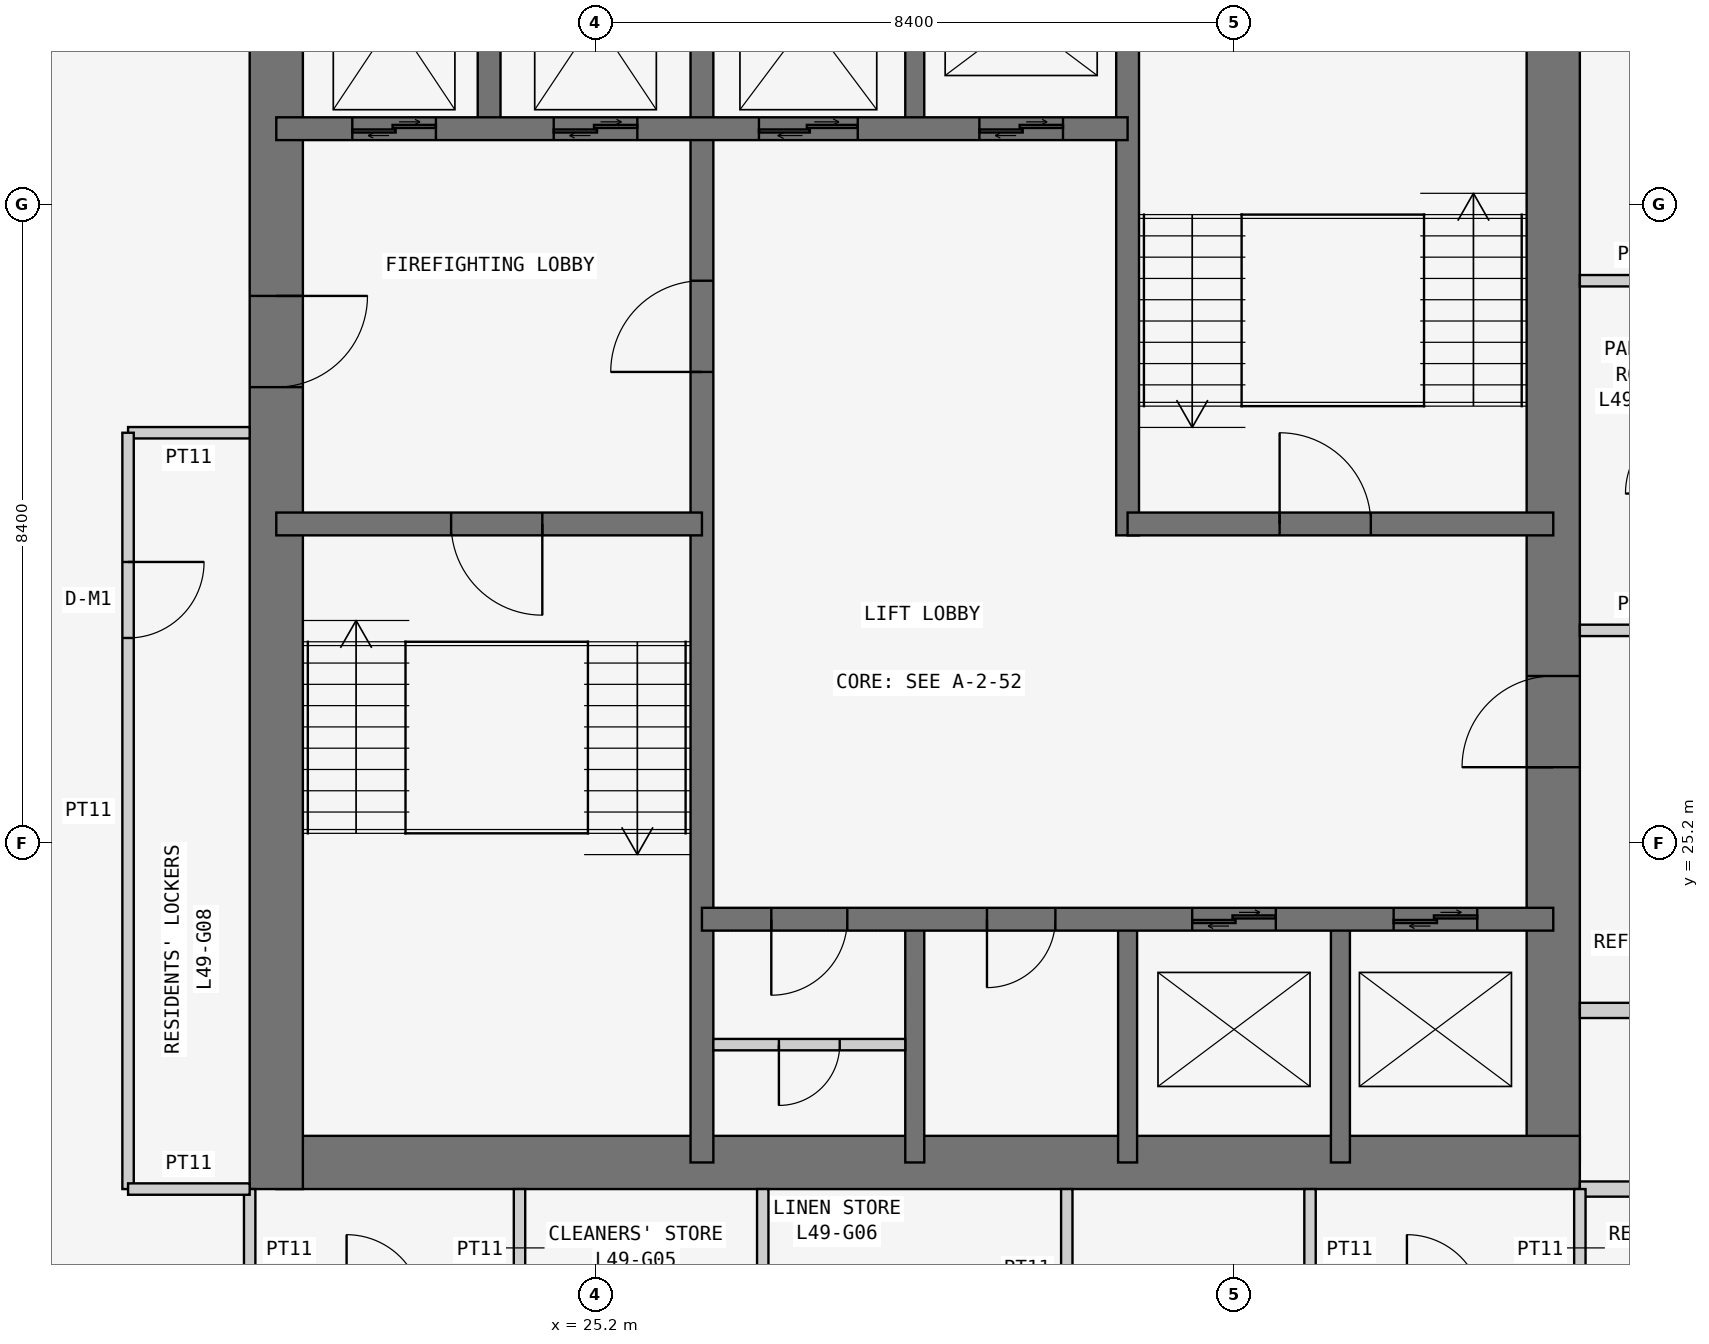
"""IFC4 building model, lengths in metres.
Left out: names, types, materials, properties, quantities, classifications, styles, units other than length and angle.
Written with IfcOpenShell. Run it as: python <this file> out.ifc"""

import sys

from ifc_helpers import new_model, si_unit, direction, frame, frame_2d, origin, place, context, subcontext, project, spatial, rectangle, extrude, element, fill, save


model = new_model("IFC4")
c1 = context("Model", 3, precision=1e-05, world=origin(), true_north=direction((0.0, 1.0)))
c2 = subcontext(c1, "Body", "Model", "MODEL_VIEW")
j1 = project(units=[si_unit("LENGTHUNIT", "METRE"), si_unit("PLANEANGLEUNIT", "RADIAN")], contexts=[c1])
p1 = place(None, origin())
s1 = spatial("IfcSite", under=j1, at=p1, CompositionType="ELEMENT")
p2 = place(p1, origin())
s2 = spatial("IfcBuilding", under=s1, at=p2, CompositionType="ELEMENT")
p3 = place(p2, frame((0.0, 0.0, 190.5)))
s3 = spatial("IfcBuildingStorey", under=s2, at=p3, CompositionType="ELEMENT", Elevation=190.5)
p4 = place(p3, frame((21.0, 21.0, 0.0), z_axis=(0.0, 0.0, 1.0), x_axis=(1.0, 0.0, 0.0)))
e1 = element("IfcWall", 1, at=p4, inside=s3, PredefinedType="SHEAR", context=c2, shape_type="SweptSolid", body=[
    extrude(rectangle(XDim=17.15, YDim=0.7, at=frame_2d((8.575, 0.0))), origin(), (0.0, 0.0, 1.0), 3.6),
])
p5 = place(p3, frame((37.8, 21.0, 0.0), z_axis=(0.0, 0.0, 1.0), x_axis=(0.0, 1.0, 0.0)))
e2 = element("IfcWall", 2, at=p5, inside=s3, PredefinedType="SHEAR", context=c2, shape_type="SweptSolid", body=[
    extrude(rectangle(XDim=17.15, YDim=0.7, at=frame_2d((8.575, 0.0))), origin(), (0.0, 0.0, 1.0), 3.6),
])
p6 = place(p5, frame((5.2, 0.0, 0.0)))
e3 = element("IfcOpeningElement", 3, at=p6, cuts=e2, PredefinedType="OPENING", context=c2, shape_type="SweptSolid", body=[
    extrude(rectangle(XDim=1.2, YDim=2.1, at=frame_2d((0.6, 1.05))), frame((0.0, 0.36, 0.0), z_axis=(0.0, -1.0, 0.0), x_axis=(1.0, 0.0, 0.0)), (0.0, 0.0, 1.0), 0.72),
])
p7 = place(p3, frame((21.0, 37.8, 0.0), z_axis=(0.0, 0.0, 1.0), x_axis=(0.0, -1.0, 0.0)))
e4 = element("IfcWall", 4, at=p7, inside=s3, PredefinedType="SHEAR", context=c2, shape_type="SweptSolid", body=[
    extrude(rectangle(XDim=17.15, YDim=0.7, at=frame_2d((8.575, 0.0))), origin(), (0.0, 0.0, 1.0), 3.6),
])
p8 = place(p7, frame((5.4, 0.0, 0.0)))
e5 = element("IfcOpeningElement", 5, at=p8, cuts=e4, PredefinedType="OPENING", context=c2, shape_type="SweptSolid", body=[
    extrude(rectangle(XDim=1.2, YDim=2.1, at=frame_2d((0.6, 1.05))), frame((0.0, 0.36, 0.0), z_axis=(0.0, -1.0, 0.0), x_axis=(1.0, 0.0, 0.0)), (0.0, 0.0, 1.0), 0.72),
])
p9 = place(p3, frame((26.6, 21.0, 0.0), z_axis=(0.0, 0.0, 1.0), x_axis=(0.0, 1.0, 0.0)))
e6 = element("IfcWall", 6, at=p9, inside=s3, PredefinedType="SHEAR", context=c2, shape_type="SweptSolid", body=[
    extrude(rectangle(XDim=16.8, YDim=0.3, at=frame_2d((8.4, 0.0))), origin(), (0.0, 0.0, 1.0), 3.6),
])
p10 = place(p9, frame((10.4, 0.0, 0.0)))
e7 = element("IfcOpeningElement", 7, at=p10, cuts=e6, PredefinedType="OPENING", context=c2, shape_type="SweptSolid", body=[
    extrude(rectangle(XDim=1.2, YDim=2.1, at=frame_2d((0.6, 1.05))), frame((0.0, 0.16, 0.0), z_axis=(0.0, -1.0, 0.0), x_axis=(1.0, 0.0, 0.0)), (0.0, 0.0, 1.0), 0.32),
])
p11 = place(p3, frame((21.0, 29.4, 0.0), z_axis=(0.0, 0.0, 1.0), x_axis=(1.0, 0.0, 0.0)))
e8 = element("IfcWall", 8, at=p11, inside=s3, PredefinedType="SHEAR", context=c2, shape_type="SweptSolid", body=[
    extrude(rectangle(XDim=5.6, YDim=0.3, at=frame_2d((2.8, 0.0))), origin(), (0.0, 0.0, 1.0), 3.6),
])
p12 = place(p11, frame((2.3, 0.0, 0.0)))
e9 = element("IfcOpeningElement", 9, at=p12, cuts=e8, PredefinedType="OPENING", context=c2, shape_type="SweptSolid", body=[
    extrude(rectangle(XDim=1.2, YDim=2.1, at=frame_2d((0.6, 1.05))), frame((0.0, 0.16, 0.0), z_axis=(0.0, -1.0, 0.0), x_axis=(1.0, 0.0, 0.0)), (0.0, 0.0, 1.0), 0.32),
])
p13 = place(p3, frame((21.0, 34.6, 0.0), z_axis=(0.0, 0.0, 1.0), x_axis=(1.0, 0.0, 0.0)))
e10 = element("IfcWall", 10, at=p13, inside=s3, PredefinedType="SHEAR", context=c2, shape_type="SweptSolid", body=[
    extrude(rectangle(XDim=11.2, YDim=0.3, at=frame_2d((5.6, 0.0))), origin(), (0.0, 0.0, 1.0), 3.6),
])
p14 = place(p13, frame((9.25, 0.0, 0.0)))
e11 = element("IfcOpeningElement", 11, at=p14, cuts=e10, PredefinedType="OPENING", context=c2, shape_type="SweptSolid", body=[
    extrude(rectangle(XDim=1.1, YDim=2.1, at=frame_2d((0.55, 1.05))), frame((0.0, 0.16, 0.0), z_axis=(0.0, -1.0, 0.0), x_axis=(1.0, 0.0, 0.0)), (0.0, 0.0, 1.0), 0.32),
])
p15 = place(p13, frame((1.0, 0.0, 0.0)))
e12 = element("IfcOpeningElement", 12, at=p15, cuts=e10, PredefinedType="OPENING", context=c2, shape_type="SweptSolid", body=[
    extrude(rectangle(XDim=1.1, YDim=2.1, at=frame_2d((0.55, 1.05))), frame((0.0, 0.16, 0.0), z_axis=(0.0, -1.0, 0.0), x_axis=(1.0, 0.0, 0.0)), (0.0, 0.0, 1.0), 0.32),
])
p16 = place(p13, frame((3.65, 0.0, 0.0)))
e13 = element("IfcOpeningElement", 13, at=p16, cuts=e10, PredefinedType="OPENING", context=c2, shape_type="SweptSolid", body=[
    extrude(rectangle(XDim=1.1, YDim=2.1, at=frame_2d((0.55, 1.05))), frame((0.0, 0.16, 0.0), z_axis=(0.0, -1.0, 0.0), x_axis=(1.0, 0.0, 0.0)), (0.0, 0.0, 1.0), 0.32),
])
p17 = place(p13, frame((6.35, 0.0, 0.0)))
e14 = element("IfcOpeningElement", 14, at=p17, cuts=e10, PredefinedType="OPENING", context=c2, shape_type="SweptSolid", body=[
    extrude(rectangle(XDim=1.3, YDim=2.1, at=frame_2d((0.65, 1.05))), frame((0.0, 0.16, 0.0), z_axis=(0.0, -1.0, 0.0), x_axis=(1.0, 0.0, 0.0)), (0.0, 0.0, 1.0), 0.32),
])
p18 = place(p3, frame((23.8, 34.6, 0.0), z_axis=(0.0, 0.0, 1.0), x_axis=(0.0, 1.0, 0.0)))
e15 = element("IfcWall", 15, at=p18, inside=s3, PredefinedType="SHEAR", context=c2, shape_type="SweptSolid", body=[
    extrude(rectangle(XDim=3.2, YDim=0.3, at=frame_2d((1.6, 0.0))), origin(), (0.0, 0.0, 1.0), 3.6),
])
p19 = place(p3, frame((26.6, 24.2, 0.0), z_axis=(0.0, 0.0, 1.0), x_axis=(1.0, 0.0, 0.0)))
e16 = element("IfcWall", 16, at=p19, inside=s3, PredefinedType="SHEAR", context=c2, shape_type="SweptSolid", body=[
    extrude(rectangle(XDim=11.2, YDim=0.3, at=frame_2d((5.6, 0.0))), origin(), (0.0, 0.0, 1.0), 3.6),
])
p20 = place(p19, frame((0.913, 0.0, 0.0)))
e17 = element("IfcOpeningElement", 17, at=p20, cuts=e16, PredefinedType="OPENING", context=c2, shape_type="SweptSolid", body=[
    extrude(rectangle(XDim=1.0, YDim=2.1, at=frame_2d((0.5, 1.05))), frame((0.0, 0.16, 0.0), z_axis=(0.0, -1.0, 0.0), x_axis=(1.0, 0.0, 0.0)), (0.0, 0.0, 1.0), 0.32),
])
p21 = place(p19, frame((3.75, 0.0, 0.0)))
e18 = element("IfcOpeningElement", 18, at=p21, cuts=e16, PredefinedType="OPENING", context=c2, shape_type="SweptSolid", body=[
    extrude(rectangle(XDim=0.9, YDim=2.1, at=frame_2d((0.45, 1.05))), frame((0.0, 0.16, 0.0), z_axis=(0.0, -1.0, 0.0), x_axis=(1.0, 0.0, 0.0)), (0.0, 0.0, 1.0), 0.32),
])
p22 = place(p19, frame((6.45, 0.0, 0.0)))
e19 = element("IfcOpeningElement", 19, at=p22, cuts=e16, PredefinedType="OPENING", context=c2, shape_type="SweptSolid", body=[
    extrude(rectangle(XDim=1.1, YDim=2.1, at=frame_2d((0.55, 1.05))), frame((0.0, 0.16, 0.0), z_axis=(0.0, -1.0, 0.0), x_axis=(1.0, 0.0, 0.0)), (0.0, 0.0, 1.0), 0.32),
])
p23 = place(p19, frame((9.1, 0.0, 0.0)))
e20 = element("IfcOpeningElement", 20, at=p23, cuts=e16, PredefinedType="OPENING", context=c2, shape_type="SweptSolid", body=[
    extrude(rectangle(XDim=1.1, YDim=2.1, at=frame_2d((0.55, 1.05))), frame((0.0, 0.16, 0.0), z_axis=(0.0, -1.0, 0.0), x_axis=(1.0, 0.0, 0.0)), (0.0, 0.0, 1.0), 0.32),
])
p24 = place(p3, frame((32.2, 29.25, 0.0), z_axis=(0.0, 0.0, 1.0), x_axis=(0.0, 1.0, 0.0)))
e21 = element("IfcWall", 21, at=p24, inside=s3, PredefinedType="SHEAR", context=c2, shape_type="SweptSolid", body=[
    extrude(rectangle(XDim=8.55, YDim=0.3, at=frame_2d((4.275, 0.0))), origin(), (0.0, 0.0, 1.0), 3.6),
])
p25 = place(p3, frame((32.2, 29.4, 0.0), z_axis=(0.0, 0.0, 1.0), x_axis=(1.0, 0.0, 0.0)))
e22 = element("IfcWall", 22, at=p25, inside=s3, PredefinedType="SHEAR", context=c2, shape_type="SweptSolid", body=[
    extrude(rectangle(XDim=5.6, YDim=0.3, at=frame_2d((2.8, 0.0))), origin(), (0.0, 0.0, 1.0), 3.6),
])
p26 = place(p25, frame((2.0, 0.0, 0.0)))
e23 = element("IfcOpeningElement", 23, at=p26, cuts=e22, PredefinedType="OPENING", context=c2, shape_type="SweptSolid", body=[
    extrude(rectangle(XDim=1.2, YDim=2.1, at=frame_2d((0.6, 1.05))), frame((0.0, 0.16, 0.0), z_axis=(0.0, -1.0, 0.0), x_axis=(1.0, 0.0, 0.0)), (0.0, 0.0, 1.0), 0.32),
])
for number, where, z_axis, x_axis in (
    (24, (29.4, 21.0, 0.0), (0.0, 0.0, 1.0), (0.0, 1.0, 0.0)),
    (25, (32.2, 21.0, 0.0), (0.0, 0.0, 1.0), (0.0, 1.0, 0.0)),
    (26, (35.0, 21.0, 0.0), (0.0, 0.0, 1.0), (0.0, 1.0, 0.0)),
    (27, (29.4, 34.6, 0.0), (0.0, 0.0, 1.0), (0.0, 1.0, 0.0)),
):
    element("IfcWall", number, at=place(p3, frame(where, z_axis=z_axis, x_axis=x_axis)), inside=s3, PredefinedType="SHEAR", context=c2, shape_type="SweptSolid", body=[
        extrude(rectangle(XDim=3.2, YDim=0.25, at=frame_2d((1.6, 0.0))), origin(), (0.0, 0.0, 1.0), 3.6),
    ])
for number, where, z_axis, x_axis in (
    (28, (38.15, 20.65, 0.0), (0.0, 0.0, 1.0), (1.0, 0.0, 0.0)),
    (29, (40.6, 23.0, 0.0), (0.0, 0.0, 1.0), (-1.0, 0.0, 0.0)),
):
    element("IfcWall", number, at=place(p3, frame(where, z_axis=z_axis, x_axis=x_axis)), inside=s3, PredefinedType="PARTITIONING", context=c2, shape_type="SweptSolid", body=[
        extrude(rectangle(XDim=2.45, YDim=0.2, at=frame_2d((1.225, 0.0))), origin(), (0.0, 0.0, 1.0), 3.45),
    ])
for number, where, z_axis, x_axis in (
    (30, (38.15, 28.0, 0.0), (0.0, 0.0, 1.0), (1.0, 0.0, 0.0)),
    (31, (39.75, 32.6, 0.0), (0.0, 0.0, 1.0), (-1.0, 0.0, 0.0)),
):
    element("IfcWall", number, at=place(p3, frame(where, z_axis=z_axis, x_axis=x_axis)), inside=s3, PredefinedType="PARTITIONING", context=c2, shape_type="SweptSolid", body=[
        extrude(rectangle(XDim=1.6, YDim=0.15, at=frame_2d((0.8, 0.0))), origin(), (0.0, 0.0, 1.0), 3.45),
    ])
for number, where, z_axis, x_axis in (
    (32, (20.65, 20.65, 0.0), (0.0, 0.0, 1.0), (0.0, -1.0, 0.0)),
    (33, (24.2, 19.05, 0.0), (0.0, 0.0, 1.0), (0.0, 1.0, 0.0)),
):
    element("IfcWall", number, at=place(p3, frame(where, z_axis=z_axis, x_axis=x_axis)), inside=s3, PredefinedType="PARTITIONING", context=c2, shape_type="SweptSolid", body=[
        extrude(rectangle(XDim=1.6, YDim=0.15, at=frame_2d((0.8, 0.0))), origin(), (0.0, 0.0, 1.0), 3.45),
    ])
for number, where, z_axis, x_axis in (
    (34, (27.4, 20.65, 0.0), (0.0, 0.0, 1.0), (0.0, -1.0, 0.0)),
    (35, (31.4, 18.55, 0.0), (0.0, 0.0, 1.0), (0.0, 1.0, 0.0)),
):
    element("IfcWall", number, at=place(p3, frame(where, z_axis=z_axis, x_axis=x_axis)), inside=s3, PredefinedType="PARTITIONING", context=c2, shape_type="SweptSolid", body=[
        extrude(rectangle(XDim=2.1, YDim=0.15, at=frame_2d((1.05, 0.0))), origin(), (0.0, 0.0, 1.0), 3.45),
    ])
for number, where, z_axis, x_axis in (
    (36, (34.6, 20.65, 0.0), (0.0, 0.0, 1.0), (0.0, -1.0, 0.0)),
    (37, (38.15, 19.05, 0.0), (0.0, 0.0, 1.0), (0.0, 1.0, 0.0)),
    (38, (20.65, 30.6, 0.0), (0.0, 0.0, 1.0), (-1.0, 0.0, 0.0)),
):
    element("IfcWall", number, at=place(p3, frame(where, z_axis=z_axis, x_axis=x_axis)), inside=s3, PredefinedType="PARTITIONING", context=c2, shape_type="SweptSolid", body=[
        extrude(rectangle(XDim=1.6, YDim=0.15, at=frame_2d((0.8, 0.0))), origin(), (0.0, 0.0, 1.0), 3.45),
    ])
p27 = place(p3, frame((19.05, 30.6, 0.0), z_axis=(0.0, 0.0, 1.0), x_axis=(0.0, -1.0, 0.0)))
e39 = element("IfcWall", 39, at=p27, inside=s3, PredefinedType="PARTITIONING", context=c2, shape_type="SweptSolid", body=[
    extrude(rectangle(XDim=9.95, YDim=0.15, at=frame_2d((4.975, 0.0))), origin(), (0.0, 0.0, 1.0), 3.45),
])
p28 = place(p27, frame((1.7, 0.0, 0.0)))
e40 = element("IfcOpeningElement", 40, at=p28, cuts=e39, PredefinedType="OPENING", context=c2, shape_type="SweptSolid", body=[
    extrude(rectangle(XDim=1.0, YDim=2.1, at=frame_2d((0.5, 1.05))), frame((0.0, 0.085, 0.0), z_axis=(0.0, -1.0, 0.0), x_axis=(1.0, 0.0, 0.0)), (0.0, 0.0, 1.0), 0.17),
])
p29 = place(p3, frame((19.05, 20.65, 0.0), z_axis=(0.0, 0.0, 1.0), x_axis=(1.0, 0.0, 0.0)))
e41 = element("IfcWall", 41, at=p29, inside=s3, PredefinedType="PARTITIONING", context=c2, shape_type="SweptSolid", body=[
    extrude(rectangle(XDim=1.6, YDim=0.15, at=frame_2d((0.8, 0.0))), origin(), (0.0, 0.0, 1.0), 3.45),
])
p30 = place(p3, frame((26.75, 22.55, 0.0), z_axis=(0.0, 0.0, 1.0), x_axis=(1.0, 0.0, 0.0)))
e42 = element("IfcWall", 42, at=p30, inside=s3, PredefinedType="PARTITIONING", context=c2, shape_type="SweptSolid", body=[
    extrude(rectangle(XDim=2.525, YDim=0.15, at=frame_2d((1.262, 0.0))), origin(), (0.0, 0.0, 1.0), 3.45),
])
p31 = place(p30, frame((0.863, 0.0, 0.0)))
e43 = element("IfcOpeningElement", 43, at=p31, cuts=e42, PredefinedType="OPENING", context=c2, shape_type="SweptSolid", body=[
    extrude(rectangle(XDim=0.8, YDim=2.1, at=frame_2d((0.4, 1.05))), frame((0.0, 0.085, 0.0), z_axis=(0.0, -1.0, 0.0), x_axis=(1.0, 0.0, 0.0)), (0.0, 0.0, 1.0), 0.17),
])
p32 = place(p28, origin())
e44 = element("IfcDoor", 44, at=p32, inside=s3, OperationType="SINGLE_SWING_LEFT", PredefinedType="DOOR", context=c2, shape_type="SweptSolid", body=[
    extrude(rectangle(XDim=1.0, YDim=2.1, at=frame_2d((0.5, 1.05))), frame((0.0, 0.025, 0.0), z_axis=(0.0, -1.0, 0.0), x_axis=(1.0, 0.0, 0.0)), (0.0, 0.0, 1.0), 0.05),
])
fill(e40, e44)
p33 = place(p8, origin())
e45 = element("IfcDoor", 45, at=p33, inside=s3, OperationType="SINGLE_SWING_LEFT", PredefinedType="DOOR", context=c2, shape_type="SweptSolid", body=[
    extrude(rectangle(XDim=1.2, YDim=2.1, at=frame_2d((0.6, 1.05))), frame((0.0, 0.025, 0.0), z_axis=(0.0, -1.0, 0.0), x_axis=(1.0, 0.0, 0.0)), (0.0, 0.0, 1.0), 0.05),
])
fill(e5, e45)
p34 = place(p12, frame((1.2, 0.0, 0.0), z_axis=(0.0, 0.0, 1.0), x_axis=(-1.0, 0.0, 0.0)))
e46 = element("IfcDoor", 46, at=p34, inside=s3, OperationType="SINGLE_SWING_LEFT", PredefinedType="DOOR", context=c2, shape_type="SweptSolid", body=[
    extrude(rectangle(XDim=1.2, YDim=2.1, at=frame_2d((0.6, 1.05))), frame((0.0, 0.025, 0.0), z_axis=(0.0, -1.0, 0.0), x_axis=(1.0, 0.0, 0.0)), (0.0, 0.0, 1.0), 0.05),
])
fill(e9, e46)
p35 = place(p10, origin())
e47 = element("IfcDoor", 47, at=p35, inside=s3, OperationType="SINGLE_SWING_LEFT", PredefinedType="DOOR", context=c2, shape_type="SweptSolid", body=[
    extrude(rectangle(XDim=1.2, YDim=2.1, at=frame_2d((0.6, 1.05))), frame((0.0, 0.025, 0.0), z_axis=(0.0, -1.0, 0.0), x_axis=(1.0, 0.0, 0.0)), (0.0, 0.0, 1.0), 0.05),
])
fill(e7, e47)
p36 = place(p6, origin())
e48 = element("IfcDoor", 48, at=p36, inside=s3, OperationType="SINGLE_SWING_LEFT", PredefinedType="DOOR", context=c2, shape_type="SweptSolid", body=[
    extrude(rectangle(XDim=1.2, YDim=2.1, at=frame_2d((0.6, 1.05))), frame((0.0, 0.025, 0.0), z_axis=(0.0, -1.0, 0.0), x_axis=(1.0, 0.0, 0.0)), (0.0, 0.0, 1.0), 0.05),
])
fill(e3, e48)
p37 = place(p26, origin())
e49 = element("IfcDoor", 49, at=p37, inside=s3, OperationType="SINGLE_SWING_LEFT", PredefinedType="DOOR", context=c2, shape_type="SweptSolid", body=[
    extrude(rectangle(XDim=1.2, YDim=2.1, at=frame_2d((0.6, 1.05))), frame((0.0, 0.025, 0.0), z_axis=(0.0, -1.0, 0.0), x_axis=(1.0, 0.0, 0.0)), (0.0, 0.0, 1.0), 0.05),
])
fill(e23, e49)
p38 = place(p20, frame((1.0, 0.0, 0.0), z_axis=(0.0, 0.0, 1.0), x_axis=(-1.0, 0.0, 0.0)))
e50 = element("IfcDoor", 50, at=p38, inside=s3, OperationType="SINGLE_SWING_RIGHT", PredefinedType="DOOR", context=c2, shape_type="SweptSolid", body=[
    extrude(rectangle(XDim=1.0, YDim=2.1, at=frame_2d((0.5, 1.05))), frame((0.0, 0.025, 0.0), z_axis=(0.0, -1.0, 0.0), x_axis=(1.0, 0.0, 0.0)), (0.0, 0.0, 1.0), 0.05),
])
fill(e17, e50)
p39 = place(p31, frame((0.8, 0.0, 0.0), z_axis=(0.0, 0.0, 1.0), x_axis=(-1.0, 0.0, 0.0)))
e51 = element("IfcDoor", 51, at=p39, inside=s3, OperationType="SINGLE_SWING_RIGHT", PredefinedType="DOOR", context=c2, shape_type="SweptSolid", body=[
    extrude(rectangle(XDim=0.8, YDim=2.1, at=frame_2d((0.4, 1.05))), frame((0.0, 0.025, 0.0), z_axis=(0.0, -1.0, 0.0), x_axis=(1.0, 0.0, 0.0)), (0.0, 0.0, 1.0), 0.05),
])
fill(e43, e51)
p40 = place(p21, frame((0.9, 0.0, 0.0), z_axis=(0.0, 0.0, 1.0), x_axis=(-1.0, 0.0, 0.0)))
e52 = element("IfcDoor", 52, at=p40, inside=s3, OperationType="SINGLE_SWING_RIGHT", PredefinedType="DOOR", context=c2, shape_type="SweptSolid", body=[
    extrude(rectangle(XDim=0.9, YDim=2.1, at=frame_2d((0.45, 1.05))), frame((0.0, 0.025, 0.0), z_axis=(0.0, -1.0, 0.0), x_axis=(1.0, 0.0, 0.0)), (0.0, 0.0, 1.0), 0.05),
])
fill(e18, e52)
p41 = place(p22, origin())
e53 = element("IfcDoor", 53, at=p41, inside=s3, OperationType="DOUBLE_DOOR_SLIDING", PredefinedType="DOOR", context=c2, shape_type="SweptSolid", body=[
    extrude(rectangle(XDim=1.1, YDim=2.1, at=frame_2d((0.55, 1.05))), frame((0.0, 0.025, 0.0), z_axis=(0.0, -1.0, 0.0), x_axis=(1.0, 0.0, 0.0)), (0.0, 0.0, 1.0), 0.05),
])
fill(e19, e53)
p42 = place(p23, origin())
e54 = element("IfcDoor", 54, at=p42, inside=s3, OperationType="DOUBLE_DOOR_SLIDING", PredefinedType="DOOR", context=c2, shape_type="SweptSolid", body=[
    extrude(rectangle(XDim=1.1, YDim=2.1, at=frame_2d((0.55, 1.05))), frame((0.0, 0.025, 0.0), z_axis=(0.0, -1.0, 0.0), x_axis=(1.0, 0.0, 0.0)), (0.0, 0.0, 1.0), 0.05),
])
fill(e20, e54)
p43 = place(p14, origin())
e55 = element("IfcDoor", 55, at=p43, inside=s3, OperationType="DOUBLE_DOOR_SLIDING", PredefinedType="DOOR", context=c2, shape_type="SweptSolid", body=[
    extrude(rectangle(XDim=1.1, YDim=2.1, at=frame_2d((0.55, 1.05))), frame((0.0, 0.025, 0.0), z_axis=(0.0, -1.0, 0.0), x_axis=(1.0, 0.0, 0.0)), (0.0, 0.0, 1.0), 0.05),
])
fill(e11, e55)
p44 = place(p15, origin())
e56 = element("IfcDoor", 56, at=p44, inside=s3, OperationType="DOUBLE_DOOR_SLIDING", PredefinedType="DOOR", context=c2, shape_type="SweptSolid", body=[
    extrude(rectangle(XDim=1.1, YDim=2.1, at=frame_2d((0.55, 1.05))), frame((0.0, 0.025, 0.0), z_axis=(0.0, -1.0, 0.0), x_axis=(1.0, 0.0, 0.0)), (0.0, 0.0, 1.0), 0.05),
])
fill(e12, e56)
p45 = place(p16, origin())
e57 = element("IfcDoor", 57, at=p45, inside=s3, OperationType="DOUBLE_DOOR_SLIDING", PredefinedType="DOOR", context=c2, shape_type="SweptSolid", body=[
    extrude(rectangle(XDim=1.1, YDim=2.1, at=frame_2d((0.55, 1.05))), frame((0.0, 0.025, 0.0), z_axis=(0.0, -1.0, 0.0), x_axis=(1.0, 0.0, 0.0)), (0.0, 0.0, 1.0), 0.05),
])
fill(e13, e57)
p46 = place(p17, origin())
e58 = element("IfcDoor", 58, at=p46, inside=s3, OperationType="DOUBLE_DOOR_SLIDING", PredefinedType="DOOR", context=c2, shape_type="SweptSolid", body=[
    extrude(rectangle(XDim=1.3, YDim=2.1, at=frame_2d((0.65, 1.05))), frame((0.0, 0.025, 0.0), z_axis=(0.0, -1.0, 0.0), x_axis=(1.0, 0.0, 0.0)), (0.0, 0.0, 1.0), 0.05),
])
fill(e14, e58)
save(model, sys.argv[1])
